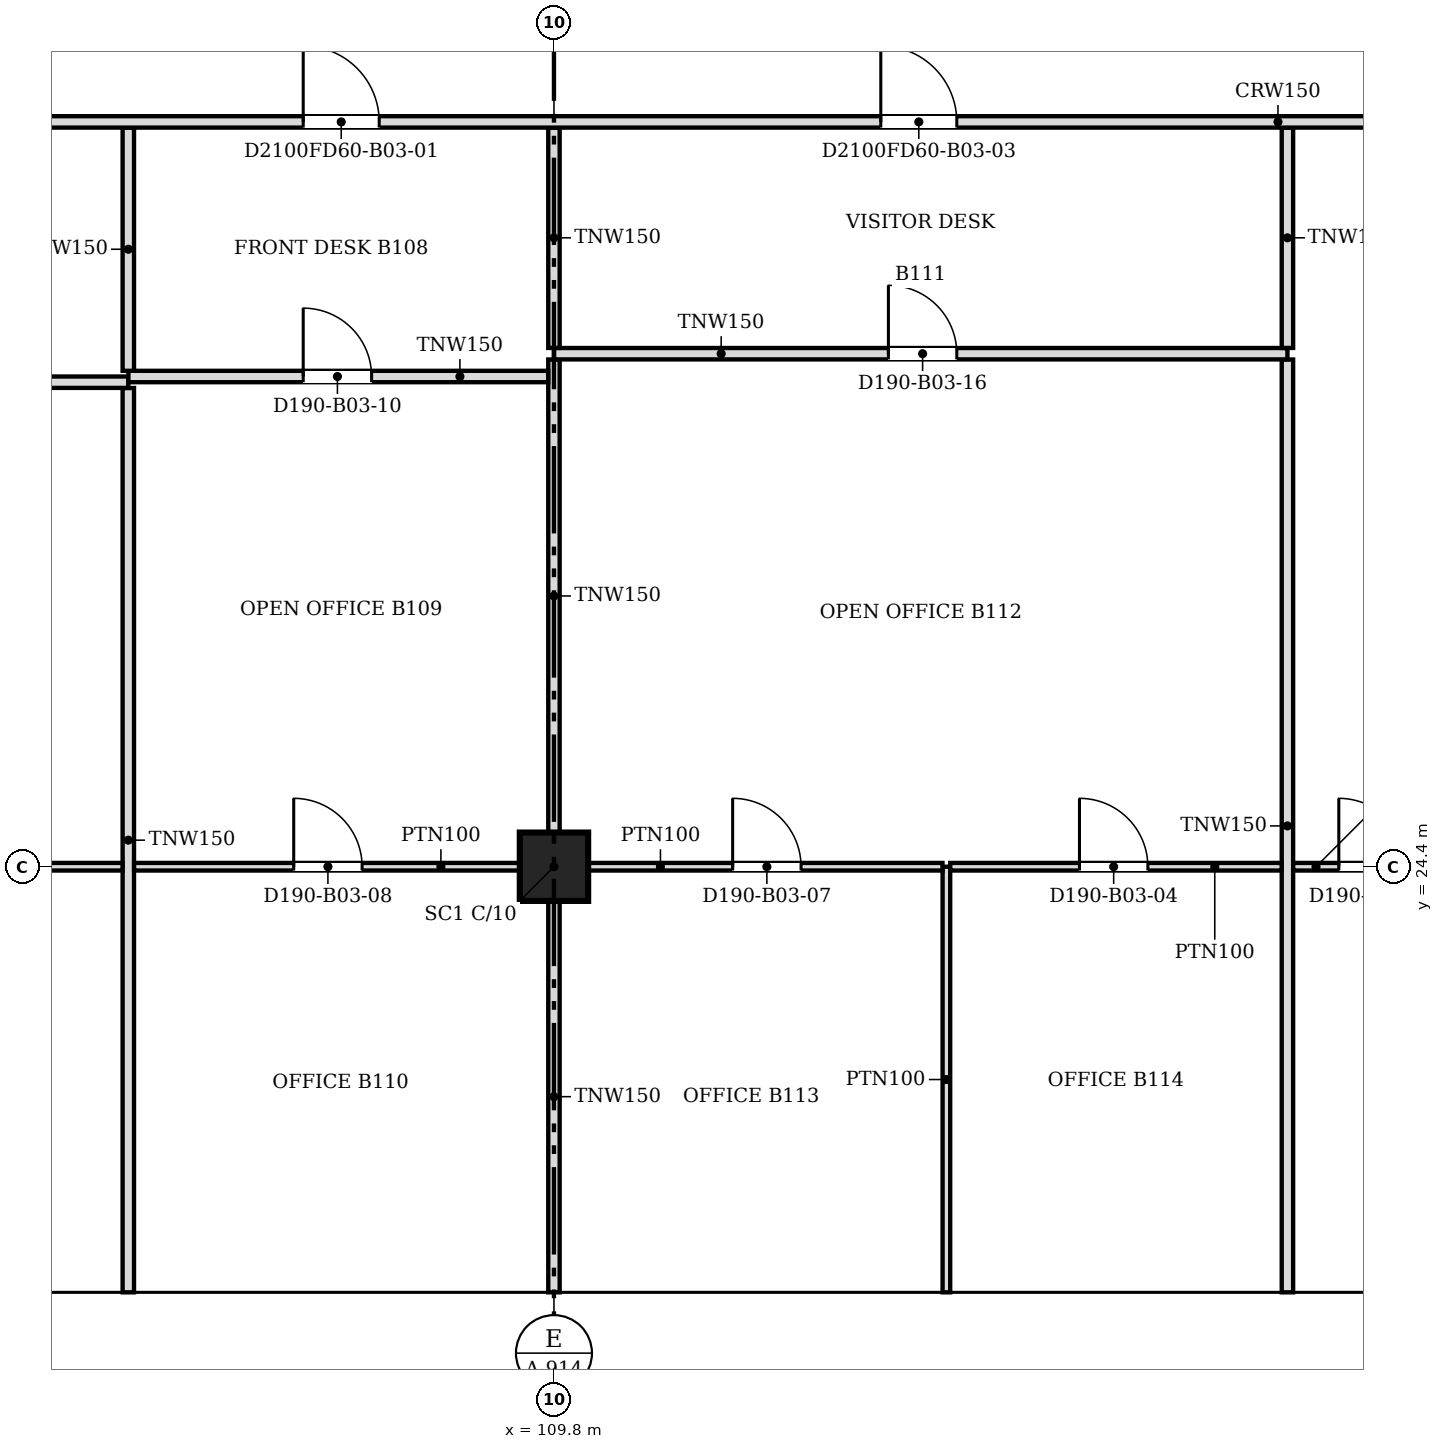
"""IFC4 building model, lengths in metres.
Left out: names, types, materials, properties, quantities, classifications, styles, units other than length and angle.
Written with IfcOpenShell. Run it as: python <this file> out.ifc"""

import sys

from ifc_helpers import new_model, si_unit, direction, frame, frame_2d, origin, origin_2d, place, context, subcontext, project, spatial, polyline, rectangle, outline, extrude, faceted_brep, source, transform, mapped, element, fill, save


model = new_model("IFC4")
c1 = context("Model", 3, precision=1e-05, world=origin(), true_north=direction((0.0, 1.0)))
c2 = subcontext(c1, "Body", "Model", "MODEL_VIEW")
j1 = project(units=[si_unit("LENGTHUNIT", "METRE"), si_unit("PLANEANGLEUNIT", "RADIAN")], contexts=[c1])
p1 = place(None, origin())
s1 = spatial("IfcSite", under=j1, at=p1, CompositionType="ELEMENT")
p2 = place(p1, origin())
s2 = spatial("IfcBuilding", under=s1, at=p2, CompositionType="ELEMENT")
p3 = place(p2, frame((0.0, 0.0, 33.4)))
s3 = spatial("IfcBuildingStorey", under=s2, at=p3, CompositionType="ELEMENT", Elevation=33.4)
p4 = place(p3, frame((109.8, 24.4, 0.0), z_axis=(0.0, 0.0, 1.0), x_axis=(1.0, 0.0, 0.0)))
e1 = element("IfcColumn", 1, at=p4, inside=s3, PredefinedType="COLUMN", context=c2, shape_type="SweptSolid", body=[
    extrude(rectangle(XDim=0.9, YDim=0.9, at=origin_2d()), origin(), (0.0, 0.0, 1.0), 3.6),
])
m1 = source(origin(), c2, "Body", "SweptSolid", [
    extrude(outline(polyline([(3.05, 0.0), (6.1, 3.8), (3.05, 7.6), (0.0, 3.8), (3.05, 0.0)])), frame((0.0, 0.25, 0.0), z_axis=(0.0, -1.0, 0.0), x_axis=(1.0, 0.0, 0.0)), (0.0, 0.0, 1.0), 0.5),
])
p5 = place(p3, frame((100.65, 18.55, -3.8), z_axis=(0.0, 0.0, 1.0), x_axis=(1.0, 0.0, 0.0)))
e2 = element("IfcWall", 2, at=p5, inside=s3, PredefinedType="SOLIDWALL", context=c2, shape_type="MappedRepresentation", body=[
    mapped(m1, transform((0.0, 0.0, 0.0), scale=1.0)),
])
m2 = source(origin(), c2, "Body", "SweptSolid", [
    extrude(outline(polyline([(3.05, 0.399), (5.78, 3.8), (3.05, 7.2), (0.321, 3.8), (3.05, 0.399)])), frame((0.0, 0.26, 0.0), z_axis=(0.0, -1.0, 0.0), x_axis=(1.0, 0.0, 0.0)), (0.0, 0.0, 1.0), 0.52),
])
p6 = place(p5, origin())
e3 = element("IfcOpeningElement", 3, at=p6, cuts=e2, PredefinedType="OPENING", context=c2, shape_type="MappedRepresentation", body=[
    mapped(m2, transform((0.0, 0.0, 0.0), scale=1.0)),
])
p7 = place(p3, frame((106.75, 18.55, -3.8), z_axis=(0.0, 0.0, 1.0), x_axis=(1.0, 0.0, 0.0)))
e4 = element("IfcWall", 4, at=p7, inside=s3, PredefinedType="SOLIDWALL", context=c2, shape_type="MappedRepresentation", body=[
    mapped(m1, transform((0.0, 0.0, 0.0), scale=1.0)),
])
p8 = place(p7, origin())
e5 = element("IfcOpeningElement", 5, at=p8, cuts=e4, PredefinedType="OPENING", context=c2, shape_type="MappedRepresentation", body=[
    mapped(m2, transform((0.0, 0.0, 0.0), scale=1.0)),
])
m3 = source(origin(), c2, "Body", "Brep", [
    faceted_brep([(3.05, -0.25, 0.0), (6.1, -0.25, 3.8), (6.1, -0.25, 3.8), (3.05, -0.25, 7.6), (0.0, -0.25, 3.8), (0.0, 0.25, 3.8), (3.05, 0.25, 7.6), (6.1, 0.25, 3.8), (6.1, 0.25, 3.8), (3.05, 0.25, 0.0)], [[[0, 1, 2, 3, 4]], [[5, 6, 7, 8, 9]], [[9, 8, 1, 0]], [[7, 6, 3, 2]], [[6, 5, 4, 3]], [[5, 9, 0, 4]], [[1, 8, 7, 2]]]),
])
p9 = place(p3, frame((112.85, 18.55, -3.8), z_axis=(0.0, 0.0, 1.0), x_axis=(1.0, 0.0, 0.0)))
e6 = element("IfcWall", 6, at=p9, inside=s3, PredefinedType="SOLIDWALL", context=c2, shape_type="MappedRepresentation", body=[
    mapped(m3, transform((0.0, 0.0, 0.0), scale=1.0)),
])
p10 = place(p9, origin())
e7 = element("IfcOpeningElement", 7, at=p10, cuts=e6, PredefinedType="OPENING", context=c2, shape_type="MappedRepresentation", body=[
    mapped(m2, transform((0.0, 0.0, 0.0), scale=1.0)),
])
p11 = place(p3, frame((118.95, 18.55, -3.8), z_axis=(0.0, 0.0, 1.0), x_axis=(1.0, 0.0, 0.0)))
e8 = element("IfcWall", 8, at=p11, inside=s3, PredefinedType="SOLIDWALL", context=c2, shape_type="MappedRepresentation", body=[
    mapped(m1, transform((0.0, 0.0, 0.0), scale=1.0)),
])
p12 = place(p11, origin())
e9 = element("IfcOpeningElement", 9, at=p12, cuts=e8, PredefinedType="OPENING", context=c2, shape_type="MappedRepresentation", body=[
    mapped(m2, transform((0.0, 0.0, 0.0), scale=1.0)),
])
p13 = place(p2, frame((0.0, 0.0, 37.2)))
s4 = spatial("IfcBuildingStorey", under=s2, at=p13, CompositionType="ELEMENT", Elevation=37.2)
m4 = source(origin(), c2, "Body", "Brep", [
    faceted_brep([(3.05, -0.25, 0.0), (6.1, -0.25, 3.8), (6.1, -0.25, 3.8), (3.05, -0.25, 7.6), (0.0, -0.25, 3.8), (0.0, 0.25, 3.8), (3.05, 0.25, 7.6), (6.1, 0.25, 3.8), (6.1, 0.25, 3.8), (3.05, 0.25, 0.0)], [[[0, 1, 2, 3, 4]], [[5, 6, 7, 8, 9]], [[9, 8, 1, 0]], [[7, 6, 3, 2]], [[6, 5, 4, 3]], [[5, 9, 0, 4]], [[1, 8, 7, 2]]]),
])
p14 = place(p13, frame((97.6, 18.55, -3.8), z_axis=(0.0, 0.0, 1.0), x_axis=(1.0, 0.0, 0.0)))
e10 = element("IfcWall", 10, at=p14, inside=s4, PredefinedType="SOLIDWALL", context=c2, shape_type="MappedRepresentation", body=[
    mapped(m4, transform((0.0, 0.0, 0.0), scale=1.0)),
])
m5 = source(origin(), c2, "Body", "SweptSolid", [
    extrude(outline(polyline([(3.05, 0.399), (5.78, 3.8), (3.05, 7.201), (0.321, 3.8), (3.05, 0.399)])), frame((0.0, 0.26, 0.0), z_axis=(0.0, -1.0, 0.0), x_axis=(1.0, 0.0, 0.0)), (0.0, 0.0, 1.0), 0.52),
])
p15 = place(p14, origin())
e11 = element("IfcOpeningElement", 11, at=p15, cuts=e10, PredefinedType="OPENING", context=c2, shape_type="MappedRepresentation", body=[
    mapped(m5, transform((0.0, 0.0, 0.0), scale=1.0)),
])
m6 = source(origin(), c2, "Body", "SweptSolid", [
    extrude(outline(polyline([(3.05, 0.0), (6.1, 3.8), (3.05, 7.6), (0.0, 3.8), (3.05, 0.0)])), frame((0.0, 0.25, 0.0), z_axis=(0.0, -1.0, 0.0), x_axis=(1.0, 0.0, 0.0)), (0.0, 0.0, 1.0), 0.5),
])
p16 = place(p13, frame((103.7, 18.55, -3.8), z_axis=(0.0, 0.0, 1.0), x_axis=(1.0, 0.0, 0.0)))
e12 = element("IfcWall", 12, at=p16, inside=s4, PredefinedType="SOLIDWALL", context=c2, shape_type="MappedRepresentation", body=[
    mapped(m6, transform((0.0, 0.0, 0.0), scale=1.0)),
])
p17 = place(p16, origin())
e13 = element("IfcOpeningElement", 13, at=p17, cuts=e12, PredefinedType="OPENING", context=c2, shape_type="MappedRepresentation", body=[
    mapped(m5, transform((0.0, 0.0, 0.0), scale=1.0)),
])
p18 = place(p13, frame((109.8, 18.55, -3.8), z_axis=(0.0, 0.0, 1.0), x_axis=(1.0, 0.0, 0.0)))
e14 = element("IfcWall", 14, at=p18, inside=s4, PredefinedType="SOLIDWALL", context=c2, shape_type="MappedRepresentation", body=[
    mapped(m4, transform((0.0, 0.0, 0.0), scale=1.0)),
])
p19 = place(p18, origin())
e15 = element("IfcOpeningElement", 15, at=p19, cuts=e14, PredefinedType="OPENING", context=c2, shape_type="MappedRepresentation", body=[
    mapped(m5, transform((0.0, 0.0, 0.0), scale=1.0)),
])
p20 = place(p13, frame((115.9, 18.55, -3.8), z_axis=(0.0, 0.0, 1.0), x_axis=(1.0, 0.0, 0.0)))
e16 = element("IfcWall", 16, at=p20, inside=s4, PredefinedType="SOLIDWALL", context=c2, shape_type="MappedRepresentation", body=[
    mapped(m6, transform((0.0, 0.0, 0.0), scale=1.0)),
])
p21 = place(p20, origin())
e17 = element("IfcOpeningElement", 17, at=p21, cuts=e16, PredefinedType="OPENING", context=c2, shape_type="MappedRepresentation", body=[
    mapped(m5, transform((0.0, 0.0, 0.0), scale=1.0)),
])
p22 = place(p3, frame((104.2, 18.8, 0.0), z_axis=(0.0, 0.0, 1.0), x_axis=(0.0, 1.0, 0.0)))
e18 = element("IfcWall", 18, at=p22, inside=s3, PredefinedType="PARTITIONING", context=c2, shape_type="SweptSolid", body=[
    extrude(rectangle(XDim=11.899, YDim=0.15, at=frame_2d((5.949, 0.0))), origin(), (0.0, 0.0, 1.0), 3.067),
])
p23 = place(p3, frame((109.8, 18.8, 0.0), z_axis=(0.0, 0.0, 1.0), x_axis=(0.0, 1.0, 0.0)))
e19 = element("IfcWall", 19, at=p23, inside=s3, PredefinedType="PARTITIONING", context=c2, shape_type="SweptSolid", body=[
    extrude(rectangle(XDim=5.149, YDim=0.15, at=frame_2d((2.574, 0.0))), origin(), (0.0, 0.0, 1.0), 3.067),
])
p24 = place(p3, frame((114.963, 18.8, 0.0), z_axis=(0.0, 0.0, 1.0), x_axis=(0.0, 1.0, 0.0)))
e20 = element("IfcWall", 20, at=p24, inside=s3, PredefinedType="PARTITIONING", context=c2, shape_type="SweptSolid", body=[
    extrude(rectangle(XDim=5.6, YDim=0.1, at=frame_2d((2.8, 0.0))), origin(), (0.0, 0.0, 1.0), 3.067),
])
p25 = place(p3, frame((119.45, 18.8, 0.0), z_axis=(0.0, 0.0, 1.0), x_axis=(0.0, 1.0, 0.0)))
e21 = element("IfcWall", 21, at=p25, inside=s3, PredefinedType="PARTITIONING", context=c2, shape_type="SweptSolid", body=[
    extrude(rectangle(XDim=12.274, YDim=0.15, at=frame_2d((6.137, 0.0))), origin(), (0.0, 0.0, 1.0), 3.067),
])
p26 = place(p3, frame((104.124, 24.4, 0.0), z_axis=(0.0, 0.0, 1.0), x_axis=(-1.0, 0.0, 0.0)))
e22 = element("IfcWall", 22, at=p26, inside=s3, PredefinedType="PARTITIONING", context=c2, shape_type="SweptSolid", body=[
    extrude(rectangle(XDim=6.073, YDim=0.1, at=frame_2d((3.037, 0.0))), origin(), (0.0, 0.0, 1.0), 3.067),
])
m7 = source(origin(), c2, "Body", "SweptSolid", [
    extrude(rectangle(XDim=0.9, YDim=2.1, at=frame_2d((0.45, 1.05))), frame((0.0, 0.06, 0.0), z_axis=(0.0, -1.0, 0.0), x_axis=(1.0, 0.0, 0.0)), (0.0, 0.0, 1.0), 0.12),
])
p27 = place(p26, frame((2.396, 0.0, 0.0)))
e23 = element("IfcOpeningElement", 23, at=p27, cuts=e22, PredefinedType="OPENING", context=c2, shape_type="MappedRepresentation", body=[
    mapped(m7, transform((0.0, 0.0, 0.0), scale=1.0)),
])
p28 = place(p3, frame((109.349, 24.4, 0.0), z_axis=(0.0, 0.0, 1.0), x_axis=(-1.0, 0.0, 0.0)))
e24 = element("IfcWall", 24, at=p28, inside=s3, PredefinedType="PARTITIONING", context=c2, shape_type="SweptSolid", body=[
    extrude(rectangle(XDim=5.073, YDim=0.1, at=frame_2d((2.537, 0.0))), origin(), (0.0, 0.0, 1.0), 3.067),
])
p29 = place(p28, frame((2.073, 0.0, 0.0)))
e25 = element("IfcOpeningElement", 25, at=p29, cuts=e24, PredefinedType="OPENING", context=c2, shape_type="MappedRepresentation", body=[
    mapped(m7, transform((0.0, 0.0, 0.0), scale=1.0)),
])
p30 = place(p3, frame((114.912, 24.4, 0.0), z_axis=(0.0, 0.0, 1.0), x_axis=(-1.0, 0.0, 0.0)))
e26 = element("IfcWall", 26, at=p30, inside=s3, PredefinedType="PARTITIONING", context=c2, shape_type="SweptSolid", body=[
    extrude(rectangle(XDim=4.661, YDim=0.1, at=frame_2d((2.33, 0.0))), origin(), (0.0, 0.0, 1.0), 3.067),
])
p31 = place(p30, frame((1.861, 0.0, 0.0)))
e27 = element("IfcOpeningElement", 27, at=p31, cuts=e26, PredefinedType="OPENING", context=c2, shape_type="MappedRepresentation", body=[
    mapped(m7, transform((0.0, 0.0, 0.0), scale=1.0)),
])
p32 = place(p3, frame((119.374, 24.4, 0.0), z_axis=(0.0, 0.0, 1.0), x_axis=(-1.0, 0.0, 0.0)))
e28 = element("IfcWall", 28, at=p32, inside=s3, PredefinedType="PARTITIONING", context=c2, shape_type="SweptSolid", body=[
    extrude(rectangle(XDim=4.36, YDim=0.1, at=frame_2d((2.18, 0.0))), origin(), (0.0, 0.0, 1.0), 3.067),
])
p33 = place(p32, frame((1.76, 0.0, 0.0)))
e29 = element("IfcOpeningElement", 29, at=p33, cuts=e28, PredefinedType="OPENING", context=c2, shape_type="MappedRepresentation", body=[
    mapped(m7, transform((0.0, 0.0, 0.0), scale=1.0)),
])
p34 = place(p3, frame((121.549, 24.4, 0.0), z_axis=(0.0, 0.0, 1.0), x_axis=(-1.0, 0.0, 0.0)))
e30 = element("IfcWall", 30, at=p34, inside=s3, PredefinedType="PARTITIONING", context=c2, shape_type="SweptSolid", body=[
    extrude(rectangle(XDim=2.023, YDim=0.1, at=frame_2d((1.012, 0.0))), origin(), (0.0, 0.0, 1.0), 3.067),
])
p35 = place(p34, frame((0.523, 0.0, 0.0)))
e31 = element("IfcOpeningElement", 31, at=p35, cuts=e30, PredefinedType="OPENING", context=c2, shape_type="MappedRepresentation", body=[
    mapped(m7, transform((0.0, 0.0, 0.0), scale=1.0)),
])
p36 = place(p3, frame((109.8, 24.851, 0.0), z_axis=(0.0, 0.0, 1.0), x_axis=(0.0, 1.0, 0.0)))
e32 = element("IfcWall", 32, at=p36, inside=s3, PredefinedType="PARTITIONING", context=c2, shape_type="SweptSolid", body=[
    extrude(rectangle(XDim=6.223, YDim=0.15, at=frame_2d((3.111, 0.0))), origin(), (0.0, 0.0, 1.0), 3.067),
])
p37 = place(p3, frame((104.2, 30.775, 0.0), z_axis=(0.0, 0.0, 1.0), x_axis=(-1.0, 0.0, 0.0)))
e33 = element("IfcWall", 33, at=p37, inside=s3, PredefinedType="PARTITIONING", context=c2, shape_type="SweptSolid", body=[
    extrude(rectangle(XDim=12.2, YDim=0.15, at=frame_2d((6.1, 0.0))), origin(), (0.0, 0.0, 1.0), 3.067),
])
m8 = source(origin(), c2, "Body", "SweptSolid", [
    extrude(rectangle(XDim=0.9, YDim=2.1, at=frame_2d((0.45, 1.05))), frame((0.0, 0.085, 0.0), z_axis=(0.0, -1.0, 0.0), x_axis=(1.0, 0.0, 0.0)), (0.0, 0.0, 1.0), 0.17),
])
p38 = place(p37, frame((5.7, 0.0, 0.0)))
e34 = element("IfcOpeningElement", 34, at=p38, cuts=e33, PredefinedType="OPENING", context=c2, shape_type="MappedRepresentation", body=[
    mapped(m8, transform((0.0, 0.0, 0.0), scale=1.0)),
])
p39 = place(p3, frame((109.724, 30.85, 0.0), z_axis=(0.0, 0.0, 1.0), x_axis=(-1.0, 0.0, 0.0)))
e35 = element("IfcWall", 35, at=p39, inside=s3, PredefinedType="PARTITIONING", context=c2, shape_type="SweptSolid", body=[
    extrude(rectangle(XDim=5.523, YDim=0.15, at=frame_2d((2.762, 0.0))), origin(), (0.0, 0.0, 1.0), 3.067),
])
p40 = place(p39, frame((2.323, 0.0, 0.0)))
e36 = element("IfcOpeningElement", 36, at=p40, cuts=e35, PredefinedType="OPENING", context=c2, shape_type="MappedRepresentation", body=[
    mapped(m8, transform((0.0, 0.0, 0.0), scale=1.0)),
])
p41 = place(p3, frame((104.2, 30.925, 0.0), z_axis=(0.0, 0.0, 1.0), x_axis=(0.0, 1.0, 0.0)))
e37 = element("IfcWall", 37, at=p41, inside=s3, PredefinedType="PARTITIONING", context=c2, shape_type="SweptSolid", body=[
    extrude(rectangle(XDim=3.199, YDim=0.15, at=frame_2d((1.6, 0.0))), origin(), (0.0, 0.0, 1.0), 3.067),
])
p42 = place(p3, frame((119.45, 31.15, 0.0), z_axis=(0.0, 0.0, 1.0), x_axis=(-1.0, 0.0, 0.0)))
e38 = element("IfcWall", 38, at=p42, inside=s3, PredefinedType="PARTITIONING", context=c2, shape_type="SweptSolid", body=[
    extrude(rectangle(XDim=9.65, YDim=0.15, at=frame_2d((4.825, 0.0))), origin(), (0.0, 0.0, 1.0), 3.067),
])
p43 = place(p42, frame((4.35, 0.0, 0.0)))
e39 = element("IfcOpeningElement", 39, at=p43, cuts=e38, PredefinedType="OPENING", context=c2, shape_type="MappedRepresentation", body=[
    mapped(m8, transform((0.0, 0.0, 0.0), scale=1.0)),
])
for number, where, z_axis, x_axis in (
    (40, (109.8, 31.226, 0.0), (0.0, 0.0, 1.0), (0.0, 1.0, 0.0)),
    (41, (119.45, 31.226, 0.0), (0.0, 0.0, 1.0), (0.0, 1.0, 0.0)),
):
    element("IfcWall", number, at=place(p3, frame(where, z_axis=z_axis, x_axis=x_axis)), inside=s3, PredefinedType="PARTITIONING", context=c2, shape_type="SweptSolid", body=[
        extrude(rectangle(XDim=2.898, YDim=0.15, at=frame_2d((1.449, 0.0))), origin(), (0.0, 0.0, 1.0), 3.067),
    ])
p44 = place(p3, frame((133.7, 34.2, 0.0), z_axis=(0.0, 0.0, 1.0), x_axis=(-1.0, 0.0, 0.0)))
e42 = element("IfcWall", 42, at=p44, inside=s3, PredefinedType="PARTITIONING", context=c2, shape_type="SweptSolid", body=[
    extrude(rectangle(XDim=47.8, YDim=0.15, at=frame_2d((23.9, 0.0))), origin(), (0.0, 0.0, 1.0), 3.067),
])
p45 = place(p44, frame((2.099, 0.0, 0.0)))
e43 = element("IfcOpeningElement", 43, at=p45, cuts=e42, PredefinedType="OPENING", context=c2, shape_type="MappedRepresentation", body=[
    mapped(m8, transform((0.0, 0.0, 0.0), scale=1.0)),
])
m9 = source(origin(), c2, "Body", "SweptSolid", [
    extrude(rectangle(XDim=1.0, YDim=2.1, at=frame_2d((0.5, 1.05))), frame((0.0, 0.085, 0.0), z_axis=(0.0, -1.0, 0.0), x_axis=(1.0, 0.0, 0.0)), (0.0, 0.0, 1.0), 0.17),
])
p46 = place(p44, frame((26.199, 0.0, 0.0)))
e44 = element("IfcOpeningElement", 44, at=p46, cuts=e42, PredefinedType="OPENING", context=c2, shape_type="MappedRepresentation", body=[
    mapped(m9, transform((0.0, 0.0, 0.0), scale=1.0)),
])
p47 = place(p44, frame((44.3, 0.0, 0.0)))
e45 = element("IfcOpeningElement", 45, at=p47, cuts=e42, PredefinedType="OPENING", context=c2, shape_type="MappedRepresentation", body=[
    mapped(m8, transform((0.0, 0.0, 0.0), scale=1.0)),
])
p48 = place(p44, frame((9.249, 0.0, 0.0)))
e46 = element("IfcOpeningElement", 46, at=p48, cuts=e42, PredefinedType="OPENING", context=c2, shape_type="MappedRepresentation", body=[
    mapped(m8, transform((0.0, 0.0, 0.0), scale=1.0)),
])
p49 = place(p44, frame((18.6, 0.0, 0.0)))
e47 = element("IfcOpeningElement", 47, at=p49, cuts=e42, PredefinedType="OPENING", context=c2, shape_type="MappedRepresentation", body=[
    mapped(m9, transform((0.0, 0.0, 0.0), scale=1.0)),
])
p50 = place(p44, frame((35.1, 0.0, 0.0)))
e48 = element("IfcOpeningElement", 48, at=p50, cuts=e42, PredefinedType="OPENING", context=c2, shape_type="MappedRepresentation", body=[
    mapped(m9, transform((0.0, 0.0, 0.0), scale=1.0)),
])
m10 = source(origin(), c2, "Body", "SweptSolid", [
    extrude(rectangle(XDim=0.9, YDim=2.1, at=frame_2d((0.45, 1.05))), frame((0.0, 0.025, 0.0), z_axis=(0.0, -1.0, 0.0), x_axis=(1.0, 0.0, 0.0)), (0.0, 0.0, 1.0), 0.05),
])
p51 = place(p35, origin())
e49 = element("IfcDoor", 49, at=p51, inside=s3, OperationType="SINGLE_SWING_RIGHT", PredefinedType="DOOR", context=c2, shape_type="MappedRepresentation", body=[
    mapped(m10, transform((0.0, 0.0, 0.0), scale=1.0)),
])
fill(e31, e49)
p52 = place(p33, origin())
e50 = element("IfcDoor", 50, at=p52, inside=s3, OperationType="SINGLE_SWING_RIGHT", PredefinedType="DOOR", context=c2, shape_type="MappedRepresentation", body=[
    mapped(m10, transform((0.0, 0.0, 0.0), scale=1.0)),
])
fill(e29, e50)
p53 = place(p31, origin())
e51 = element("IfcDoor", 51, at=p53, inside=s3, OperationType="SINGLE_SWING_RIGHT", PredefinedType="DOOR", context=c2, shape_type="MappedRepresentation", body=[
    mapped(m10, transform((0.0, 0.0, 0.0), scale=1.0)),
])
fill(e27, e51)
p54 = place(p29, origin())
e52 = element("IfcDoor", 52, at=p54, inside=s3, OperationType="SINGLE_SWING_RIGHT", PredefinedType="DOOR", context=c2, shape_type="MappedRepresentation", body=[
    mapped(m10, transform((0.0, 0.0, 0.0), scale=1.0)),
])
fill(e25, e52)
p55 = place(p40, origin())
e53 = element("IfcDoor", 53, at=p55, inside=s3, OperationType="SINGLE_SWING_RIGHT", PredefinedType="DOOR", context=c2, shape_type="MappedRepresentation", body=[
    mapped(m10, transform((0.0, 0.0, 0.0), scale=1.0)),
])
fill(e36, e53)
m11 = source(origin(), c2, "Body", "SweptSolid", [
    extrude(rectangle(XDim=1.0, YDim=2.1, at=frame_2d((0.5, 1.05))), frame((0.0, 0.025, 0.0), z_axis=(0.0, -1.0, 0.0), x_axis=(1.0, 0.0, 0.0)), (0.0, 0.0, 1.0), 0.05),
])
p56 = place(p46, origin())
e54 = element("IfcDoor", 54, at=p56, inside=s3, OperationType="SINGLE_SWING_RIGHT", PredefinedType="DOOR", context=c2, shape_type="MappedRepresentation", body=[
    mapped(m11, transform((0.0, 0.0, 0.0), scale=1.0)),
])
fill(e44, e54)
p57 = place(p49, origin())
e55 = element("IfcDoor", 55, at=p57, inside=s3, OperationType="SINGLE_SWING_RIGHT", PredefinedType="DOOR", context=c2, shape_type="MappedRepresentation", body=[
    mapped(m11, transform((0.0, 0.0, 0.0), scale=1.0)),
])
fill(e47, e55)
p58 = place(p43, origin())
e56 = element("IfcDoor", 56, at=p58, inside=s3, OperationType="SINGLE_SWING_RIGHT", PredefinedType="DOOR", context=c2, shape_type="MappedRepresentation", body=[
    mapped(m10, transform((0.0, 0.0, 0.0), scale=1.0)),
])
fill(e39, e56)
save(model, sys.argv[1])
